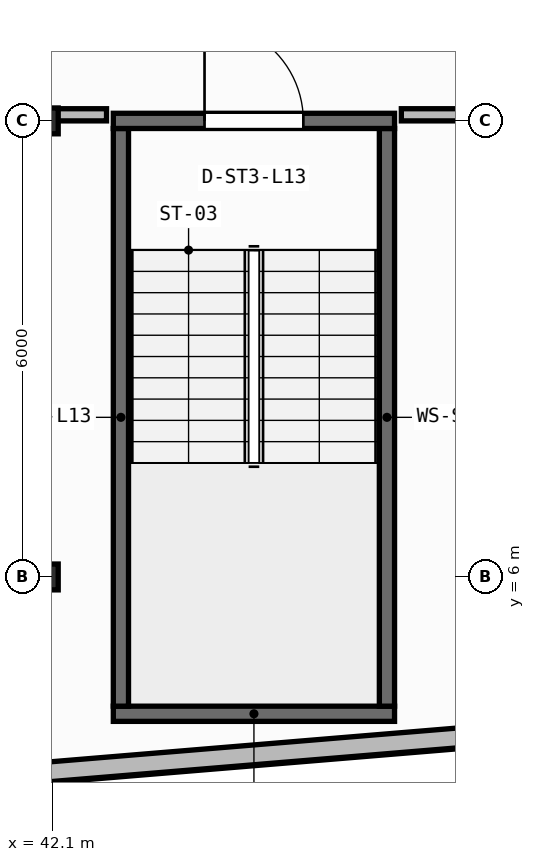
"""IFC4 building model, lengths in metres.
Left out: names, types, materials, properties, quantities, classifications, styles, units other than length and angle.
Written with IfcOpenShell. Run it as: python <this file> out.ifc"""

import sys

from ifc_helpers import new_model, si_unit, direction, frame, frame_2d, origin, origin_2d, place, context, subcontext, project, spatial, rectangle, i_section, extrude, element, fill, save


model = new_model("IFC4")
c1 = context("Model", 3, precision=1e-05, world=origin(), true_north=direction((0.0, 1.0)))
c2 = subcontext(c1, "Body", "Model", "MODEL_VIEW")
j1 = project(units=[si_unit("LENGTHUNIT", "METRE"), si_unit("PLANEANGLEUNIT", "RADIAN")], contexts=[c1])
p1 = place(None, origin())
s1 = spatial("IfcSite", under=j1, at=p1, CompositionType="ELEMENT")
p2 = place(p1, origin())
s2 = spatial("IfcBuilding", under=s1, at=p2, CompositionType="ELEMENT")
p3 = place(p2, frame((0.0, 0.0, 54.1)))
s3 = spatial("IfcBuildingStorey", under=s2, at=p3, CompositionType="ELEMENT", Elevation=54.1)
for number, where, z_axis, x_axis in (
    (1, (42.0, 6.0, 0.0), (0.0, 0.0, 1.0), (1.0, 0.0, 0.0)),
    (2, (42.0, 12.0, 0.0), (0.0, 0.0, 1.0), (1.0, 0.0, 0.0)),
):
    element("IfcColumn", number, at=place(p3, frame(where, z_axis=z_axis, x_axis=x_axis)), inside=s3, PredefinedType="COLUMN", context=c2, shape_type="SweptSolid", body=[
        extrude(i_section(OverallWidth=0.35, OverallDepth=0.34, WebThickness=0.016, FlangeThickness=0.028, at=origin_2d()), origin(), (0.0, 0.0, 1.0), 3.95),
    ])
p4 = place(p3, frame((2.76, 0.174, 0.0), z_axis=(0.0, 0.0, 1.0), x_axis=(0.996571478456, 0.082736257641, 0.0)))
e3 = element("IfcWall", 3, at=p4, inside=s3, PredefinedType="STANDARD", context=c2, shape_type="SweptSolid", body=[
    extrude(rectangle(XDim=52.861, YDim=0.26, at=frame_2d((26.431, 0.0))), origin(), (0.0, 0.0, 1.0), 3.71),
])
p5 = place(p4, frame((25.231, 0.0, 0.9)))
e4 = element("IfcOpeningElement", 4, at=p5, cuts=e3, PredefinedType="OPENING", context=c2, shape_type="SweptSolid", body=[
    extrude(rectangle(XDim=2.4, YDim=1.65, at=frame_2d((1.2, 0.825))), frame((0.0, 0.14, 0.0), z_axis=(0.0, -1.0, 0.0), x_axis=(1.0, 0.0, 0.0)), (0.0, 0.0, 1.0), 0.28),
])
p6 = place(p3, frame((42.9, 4.2, 0.0), z_axis=(0.0, 0.0, 1.0), x_axis=(1.0, 0.0, 0.0)))
e5 = element("IfcWall", 5, at=p6, inside=s3, PredefinedType="SHEAR", context=c2, shape_type="SweptSolid", body=[
    extrude(rectangle(XDim=3.7, YDim=0.2, at=frame_2d((1.85, 0.0))), origin(), (0.0, 0.0, 1.0), 3.71),
])
for number, where, z_axis, x_axis in (
    (6, (43.0, 4.3, 0.0), (0.0, 0.0, 1.0), (0.0, 1.0, 0.0)),
    (7, (46.5, 4.3, 0.0), (0.0, 0.0, 1.0), (0.0, 1.0, 0.0)),
):
    element("IfcWall", number, at=place(p3, frame(where, z_axis=z_axis, x_axis=x_axis)), inside=s3, PredefinedType="SHEAR", context=c2, shape_type="SweptSolid", body=[
        extrude(rectangle(XDim=7.6, YDim=0.2, at=frame_2d((3.8, 0.0))), origin(), (0.0, 0.0, 1.0), 3.71),
    ])
p7 = place(p3, frame((42.9, 12.0, 0.0), z_axis=(0.0, 0.0, 1.0), x_axis=(1.0, 0.0, 0.0)))
e8 = element("IfcWall", 8, at=p7, inside=s3, PredefinedType="SHEAR", context=c2, shape_type="SweptSolid", body=[
    extrude(rectangle(XDim=3.7, YDim=0.2, at=frame_2d((1.85, 0.0))), origin(), (0.0, 0.0, 1.0), 3.71),
])
p8 = place(p7, frame((1.2, 0.0, 0.0)))
e9 = element("IfcOpeningElement", 9, at=p8, cuts=e8, PredefinedType="OPENING", context=c2, shape_type="SweptSolid", body=[
    extrude(rectangle(XDim=1.3, YDim=2.15, at=frame_2d((0.65, 1.075))), frame((0.0, 0.11, 0.0), z_axis=(0.0, -1.0, 0.0), x_axis=(1.0, 0.0, 0.0)), (0.0, 0.0, 1.0), 0.22),
])
p9 = place(p3, frame((31.63, 12.08, 0.0), z_axis=(0.0, 0.0, 1.0), x_axis=(1.0, 0.0, 0.0)))
e10 = element("IfcWall", 10, at=p9, inside=s3, PredefinedType="PARTITIONING", context=c2, shape_type="SweptSolid", body=[
    extrude(rectangle(XDim=11.181, YDim=0.16, at=frame_2d((5.59, 0.0))), origin(), (0.0, 0.0, 1.0), 3.073),
])
p10 = place(p3, frame((46.689, 12.08, 0.0), z_axis=(0.0, 0.0, 1.0), x_axis=(1.0, 0.0, 0.0)))
e11 = element("IfcWall", 11, at=p10, inside=s3, PredefinedType="PARTITIONING", context=c2, shape_type="SweptSolid", body=[
    extrude(rectangle(XDim=3.011, YDim=0.16, at=frame_2d((1.505, 0.0))), origin(), (0.0, 0.0, 1.0), 3.073),
])
p11 = place(p8, origin())
e12 = element("IfcDoor", 12, at=p11, inside=s3, OperationType="SINGLE_SWING_LEFT", PredefinedType="DOOR", context=c2, shape_type="SweptSolid", body=[
    extrude(rectangle(XDim=1.3, YDim=2.15, at=frame_2d((0.65, 1.075))), frame((0.0, 0.025, 0.0), z_axis=(0.0, -1.0, 0.0), x_axis=(1.0, 0.0, 0.0)), (0.0, 0.0, 1.0), 0.05),
])
fill(e9, e12)
save(model, sys.argv[1])
